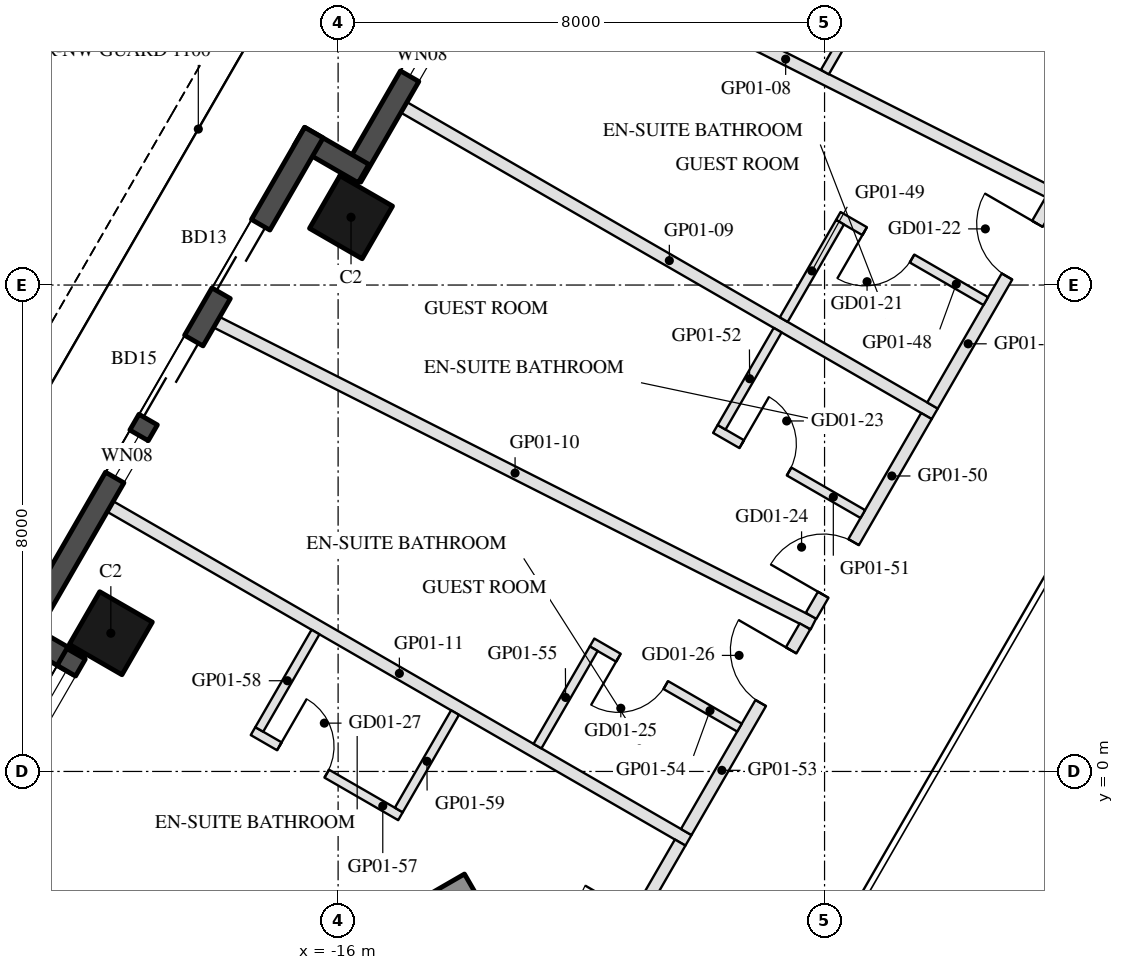
"""IFC4 building model, lengths in metres.
Left out: names, types, materials, properties, quantities, classifications, styles, units other than length and angle.
Written with IfcOpenShell. Run it as: python <this file> out.ifc"""

import sys

from ifc_helpers import new_model, si_unit, direction, frame, frame_2d, origin, origin_2d, place, context, subcontext, project, spatial, rectangle, hollow_rectangle, extrude, element, fill, save


model = new_model("IFC4")
c1 = context("Model", 3, precision=1e-05, world=origin(), true_north=direction((0.0, 1.0)))
c2 = subcontext(c1, "Body", "Model", "MODEL_VIEW")
j1 = project(units=[si_unit("LENGTHUNIT", "METRE"), si_unit("PLANEANGLEUNIT", "RADIAN")], contexts=[c1])
p1 = place(None, origin())
s1 = spatial("IfcSite", under=j1, at=p1, CompositionType="ELEMENT")
p2 = place(p1, origin())
s2 = spatial("IfcBuilding", under=s1, at=p2, CompositionType="ELEMENT")
p3 = place(p2, frame((0.0, 0.0, 50.2)))
s3 = spatial("IfcBuildingStorey", under=s2, at=p3, CompositionType="ELEMENT", Elevation=50.2)
for number, where, z_axis, x_axis in (
    (1, (-15.788, 9.115, 0.0), (0.0, 0.0, 1.0), (0.5, 0.866, 0.0)),
    (2, (-19.738, 2.273, 0.0), (0.0, 0.0, 1.0), (0.5, 0.866, 0.0)),
):
    element("IfcColumn", number, at=place(p3, frame(where, z_axis=z_axis, x_axis=x_axis)), inside=s3, PredefinedType="COLUMN", context=c2, shape_type="SweptSolid", body=[
        extrude(hollow_rectangle(XDim=1.0, YDim=1.0, WallThickness=0.045, at=origin_2d()), origin(), (0.0, 0.0, 1.0), 3.7),
    ])
p4 = place(p3, frame((-12.409, 15.617, 0.0), z_axis=(0.0, 0.0, 1.0), x_axis=(-0.500003597184, -0.866023326939, 0.0)))
e3 = element("IfcWall", 3, at=p4, inside=s3, PredefinedType="SOLIDWALL", context=c2, shape_type="SweptSolid", body=[
    extrude(rectangle(XDim=6.74, YDim=0.35, at=frame_2d((3.37, 0.0))), origin(), (0.0, 0.0, 1.0), 3.55),
])
p5 = place(p4, frame((0.32, 0.0, 0.3)))
e4 = element("IfcOpeningElement", 4, at=p5, cuts=e3, PredefinedType="OPENING", context=c2, shape_type="SweptSolid", body=[
    extrude(rectangle(XDim=1.0, YDim=2.65, at=frame_2d((0.5, 1.325))), frame((0.0, 0.185, 0.0), z_axis=(0.0, -1.0, 0.0), x_axis=(1.0, 0.0, 0.0)), (0.0, 0.0, 1.0), 0.37),
])
p6 = place(p4, frame((2.229, 0.0, 0.0)))
e5 = element("IfcOpeningElement", 5, at=p6, cuts=e3, PredefinedType="OPENING", context=c2, shape_type="SweptSolid", body=[
    extrude(rectangle(XDim=1.5, YDim=2.4, at=frame_2d((0.75, 1.2))), frame((0.0, 0.185, 0.0), z_axis=(0.0, -1.0, 0.0), x_axis=(1.0, 0.0, 0.0)), (0.0, 0.0, 1.0), 0.37),
])
p7 = place(p4, frame((4.029, 0.0, 0.3)))
e6 = element("IfcOpeningElement", 6, at=p7, cuts=e3, PredefinedType="OPENING", context=c2, shape_type="SweptSolid", body=[
    extrude(rectangle(XDim=0.8, YDim=2.65, at=frame_2d((0.4, 1.325))), frame((0.0, 0.185, 0.0), z_axis=(0.0, -1.0, 0.0), x_axis=(1.0, 0.0, 0.0)), (0.0, 0.0, 1.0), 0.37),
])
p8 = place(p3, frame((-15.581, 9.833, 0.0), z_axis=(0.0, 0.0, 1.0), x_axis=(-0.866055662726, 0.499947586314, 0.0)))
e7 = element("IfcWall", 7, at=p8, inside=s3, PredefinedType="SOLIDWALL", context=c2, shape_type="SweptSolid", body=[
    extrude(rectangle(XDim=1.22, YDim=0.35, at=frame_2d((0.61, 0.0))), origin(), (0.0, 0.0, 1.0), 3.55),
])
p9 = place(p3, frame((-16.398, 10.507, 0.0), z_axis=(0.0, 0.0, 1.0), x_axis=(-0.499999142773, -0.866025898704, 0.0)))
e8 = element("IfcWall", 8, at=p9, inside=s3, PredefinedType="SOLIDWALL", context=c2, shape_type="SweptSolid", body=[
    extrude(rectangle(XDim=9.7, YDim=0.35, at=frame_2d((4.85, 0.0))), origin(), (0.0, 0.0, 1.0), 3.55),
])
p10 = place(p9, frame((1.75, 0.0, 0.0)))
e9 = element("IfcOpeningElement", 9, at=p10, cuts=e8, PredefinedType="OPENING", context=c2, shape_type="SweptSolid", body=[
    extrude(rectangle(XDim=1.3, YDim=2.4, at=frame_2d((0.65, 1.2))), frame((0.0, 0.185, 0.0), z_axis=(0.0, -1.0, 0.0), x_axis=(1.0, 0.0, 0.0)), (0.0, 0.0, 1.0), 0.37),
])
p11 = place(p9, frame((3.95, 0.0, 0.0)))
e10 = element("IfcOpeningElement", 10, at=p11, cuts=e8, PredefinedType="OPENING", context=c2, shape_type="SweptSolid", body=[
    extrude(rectangle(XDim=1.5, YDim=2.4, at=frame_2d((0.75, 1.2))), frame((0.0, 0.185, 0.0), z_axis=(0.0, -1.0, 0.0), x_axis=(1.0, 0.0, 0.0)), (0.0, 0.0, 1.0), 0.37),
])
p12 = place(p9, frame((5.75, 0.0, 0.3)))
e11 = element("IfcOpeningElement", 11, at=p12, cuts=e8, PredefinedType="OPENING", context=c2, shape_type="SweptSolid", body=[
    extrude(rectangle(XDim=0.8, YDim=2.65, at=frame_2d((0.4, 1.325))), frame((0.0, 0.185, 0.0), z_axis=(0.0, -1.0, 0.0), x_axis=(1.0, 0.0, 0.0)), (0.0, 0.0, 1.0), 0.37),
])
p13 = place(p3, frame((-21.312, 2.346, 0.0), z_axis=(0.0, 0.0, 1.0), x_axis=(0.866005645448, -0.500034220881, 0.0)))
e12 = element("IfcWall", 12, at=p13, inside=s3, PredefinedType="SOLIDWALL", context=c2, shape_type="SweptSolid", body=[
    extrude(rectangle(XDim=1.22, YDim=0.35, at=frame_2d((0.61, 0.0))), origin(), (0.0, 0.0, 1.0), 3.55),
])
p14 = place(p3, frame((-20.309, 1.934, 0.0), z_axis=(0.0, 0.0, 1.0), x_axis=(-0.499992114976, -0.866029956157, 0.0)))
e13 = element("IfcWall", 13, at=p14, inside=s3, PredefinedType="SOLIDWALL", context=c2, shape_type="SweptSolid", body=[
    extrude(rectangle(XDim=6.74, YDim=0.35, at=frame_2d((3.37, 0.0))), origin(), (0.0, 0.0, 1.0), 3.55),
])
p15 = place(p14, frame((4.02, 0.0, 0.0)))
e14 = element("IfcOpeningElement", 14, at=p15, cuts=e13, PredefinedType="OPENING", context=c2, shape_type="SweptSolid", body=[
    extrude(rectangle(XDim=2.4, YDim=2.4, at=frame_2d((1.2, 1.2))), frame((0.0, 0.185, 0.0), z_axis=(0.0, -1.0, 0.0), x_axis=(1.0, 0.0, 0.0)), (0.0, 0.0, 1.0), 0.37),
])
p16 = place(p14, frame((0.32, 0.0, 0.3)))
e15 = element("IfcOpeningElement", 15, at=p16, cuts=e13, PredefinedType="OPENING", context=c2, shape_type="SweptSolid", body=[
    extrude(rectangle(XDim=1.5, YDim=2.65, at=frame_2d((0.75, 1.325))), frame((0.0, 0.185, 0.0), z_axis=(0.0, -1.0, 0.0), x_axis=(1.0, 0.0, 0.0)), (0.0, 0.0, 1.0), 0.37),
])
p17 = place(p14, frame((2.12, 0.0, 0.3)))
e16 = element("IfcOpeningElement", 16, at=p17, cuts=e13, PredefinedType="OPENING", context=c2, shape_type="SweptSolid", body=[
    extrude(rectangle(XDim=1.5, YDim=2.65, at=frame_2d((0.75, 1.325))), frame((0.0, 0.185, 0.0), z_axis=(0.0, -1.0, 0.0), x_axis=(1.0, 0.0, 0.0)), (0.0, 0.0, 1.0), 0.37),
])
p18 = place(p3, frame((-13.797, -1.903, 0.0), z_axis=(0.0, 0.0, 1.0), x_axis=(-0.866025009528, -0.500000682871, 0.0)))
e17 = element("IfcWall", 17, at=p18, inside=s3, PredefinedType="SHEAR", context=c2, shape_type="SweptSolid", body=[
    extrude(rectangle(XDim=14.837, YDim=0.5, at=frame_2d((7.418, 0.0))), origin(), (0.0, 0.0, 1.0), 3.5),
])
p19 = place(p3, frame((-13.147, 13.989, 0.0), z_axis=(0.0, 0.0, 1.0), x_axis=(0.892898572595, -0.450257858408, 0.0)))
e18 = element("IfcWall", 18, at=p19, inside=s3, PredefinedType="PARTITIONING", context=c2, shape_type="SweptSolid", body=[
    extrude(rectangle(XDim=10.096, YDim=0.2, at=frame_2d((5.048, 0.0))), origin(), (0.0, 0.0, 1.0), 2.96),
])
p20 = place(p3, frame((-14.917, 10.922, 0.0), z_axis=(0.0, 0.0, 1.0), x_axis=(0.866022637375, -0.500004791531, 0.0)))
e19 = element("IfcWall", 19, at=p20, inside=s3, PredefinedType="PARTITIONING", context=c2, shape_type="SweptSolid", body=[
    extrude(rectangle(XDim=10.08, YDim=0.2, at=frame_2d((5.04, 0.0))), origin(), (0.0, 0.0, 1.0), 2.96),
])
p21 = place(p3, frame((-17.997, 7.388, 0.0), z_axis=(0.0, 0.0, 1.0), x_axis=(0.892478457214, -0.451090016968, 0.0)))
e20 = element("IfcWall", 20, at=p21, inside=s3, PredefinedType="PARTITIONING", context=c2, shape_type="SweptSolid", body=[
    extrude(rectangle(XDim=10.997, YDim=0.2, at=frame_2d((5.499, 0.0))), origin(), (0.0, 0.0, 1.0), 2.96),
])
p22 = place(p3, frame((-19.747, 4.357, 0.0), z_axis=(0.0, 0.0, 1.0), x_axis=(0.866027479907, -0.499996404033, 0.0)))
e21 = element("IfcWall", 21, at=p22, inside=s3, PredefinedType="PARTITIONING", context=c2, shape_type="SweptSolid", body=[
    extrude(rectangle(XDim=10.98, YDim=0.2, at=frame_2d((5.49, 0.0))), origin(), (0.0, 0.0, 1.0), 2.96),
])
p23 = place(p3, frame((-7.068, 13.108, 0.0), z_axis=(0.0, 0.0, 1.0), x_axis=(-0.4999770169, -0.866038672677, 0.0)))
e22 = element("IfcWall", 22, at=p23, inside=s3, PredefinedType="PARTITIONING", context=c2, shape_type="SweptSolid", body=[
    extrude(rectangle(XDim=1.854, YDim=0.15, at=frame_2d((0.927, 0.0))), origin(), (0.0, 0.0, 1.0), 2.95),
])
p24 = place(p3, frame((-6.225, 6.019, 0.0), z_axis=(0.0, 0.0, 1.0), x_axis=(0.499998439657, 0.866026304647, 0.0)))
e23 = element("IfcWall", 23, at=p24, inside=s3, PredefinedType="PARTITIONING", context=c2, shape_type="SweptSolid", body=[
    extrude(rectangle(XDim=3.905, YDim=0.2, at=frame_2d((1.953, 0.0))), origin(), (0.0, 0.0, 1.0), 2.95),
])
p25 = place(p24, frame((2.45, 0.0, 0.0)))
e24 = element("IfcOpeningElement", 24, at=p25, cuts=e23, PredefinedType="OPENING", context=c2, shape_type="SweptSolid", body=[
    extrude(rectangle(XDim=1.0, YDim=2.1, at=frame_2d((0.5, 1.05))), frame((0.0, 0.11, 0.0), z_axis=(0.0, -1.0, 0.0), x_axis=(1.0, 0.0, 0.0)), (0.0, 0.0, 1.0), 0.22),
])
p26 = place(p3, frame((-5.349, 7.736, 0.0), z_axis=(0.0, 0.0, 1.0), x_axis=(-0.866056369097, 0.49994636267, 0.0)))
e25 = element("IfcWall", 25, at=p26, inside=s3, PredefinedType="PARTITIONING", context=c2, shape_type="SweptSolid", body=[
    extrude(rectangle(XDim=2.8, YDim=0.15, at=frame_2d((1.4, 0.0))), origin(), (0.0, 0.0, 1.0), 2.95),
])
p27 = place(p26, frame((1.4, 0.0, 0.0)))
e26 = element("IfcOpeningElement", 26, at=p27, cuts=e25, PredefinedType="OPENING", context=c2, shape_type="SweptSolid", body=[
    extrude(rectangle(XDim=0.9, YDim=2.1, at=frame_2d((0.45, 1.05))), frame((0.0, 0.085, 0.0), z_axis=(0.0, -1.0, 0.0), x_axis=(1.0, 0.0, 0.0)), (0.0, 0.0, 1.0), 0.17),
])
p28 = place(p3, frame((-7.746, 9.033, 0.0), z_axis=(0.0, 0.0, 1.0), x_axis=(-0.500042316284, -0.866000971088, 0.0)))
e27 = element("IfcWall", 27, at=p28, inside=s3, PredefinedType="PARTITIONING", context=c2, shape_type="SweptSolid", body=[
    extrude(rectangle(XDim=1.85, YDim=0.15, at=frame_2d((0.925, 0.0))), origin(), (0.0, 0.0, 1.0), 2.95),
])
p29 = place(p3, frame((-8.222, 2.56, 0.0), z_axis=(0.0, 0.0, 1.0), x_axis=(0.499973105789, 0.866040930607, 0.0)))
e28 = element("IfcWall", 28, at=p29, inside=s3, PredefinedType="PARTITIONING", context=c2, shape_type="SweptSolid", body=[
    extrude(rectangle(XDim=3.794, YDim=0.2, at=frame_2d((1.897, 0.0))), origin(), (0.0, 0.0, 1.0), 2.95),
])
p30 = place(p29, frame((0.4, 0.0, 0.0)))
e29 = element("IfcOpeningElement", 29, at=p30, cuts=e28, PredefinedType="OPENING", context=c2, shape_type="SweptSolid", body=[
    extrude(rectangle(XDim=1.0, YDim=2.1, at=frame_2d((0.5, 1.05))), frame((0.0, 0.11, 0.0), z_axis=(0.0, -1.0, 0.0), x_axis=(1.0, 0.0, 0.0)), (0.0, 0.0, 1.0), 0.22),
])
p31 = place(p3, frame((-9.796, 5.633, 0.0), z_axis=(0.0, 0.0, 1.0), x_axis=(0.866034573852, -0.49998411664, 0.0)))
e30 = element("IfcWall", 30, at=p31, inside=s3, PredefinedType="PARTITIONING", context=c2, shape_type="SweptSolid", body=[
    extrude(rectangle(XDim=2.8, YDim=0.15, at=frame_2d((1.4, 0.0))), origin(), (0.0, 0.0, 1.0), 2.95),
])
p32 = place(p31, frame((0.5, 0.0, 0.0)))
e31 = element("IfcOpeningElement", 31, at=p32, cuts=e30, PredefinedType="OPENING", context=c2, shape_type="SweptSolid", body=[
    extrude(rectangle(XDim=0.9, YDim=2.1, at=frame_2d((0.45, 1.05))), frame((0.0, 0.085, 0.0), z_axis=(0.0, -1.0, 0.0), x_axis=(1.0, 0.0, 0.0)), (0.0, 0.0, 1.0), 0.17),
])
p33 = place(p3, frame((-8.771, 7.258, 0.0), z_axis=(0.0, 0.0, 1.0), x_axis=(-0.500154078321, -0.865936428347, 0.0)))
e32 = element("IfcWall", 32, at=p33, inside=s3, PredefinedType="PARTITIONING", context=c2, shape_type="SweptSolid", body=[
    extrude(rectangle(XDim=1.844, YDim=0.15, at=frame_2d((0.922, 0.0))), origin(), (0.0, 0.0, 1.0), 2.95),
])
p34 = place(p3, frame((-10.275, -0.996, 0.0), z_axis=(0.0, 0.0, 1.0), x_axis=(0.499998439657, 0.866026304647, 0.0)))
e33 = element("IfcWall", 33, at=p34, inside=s3, PredefinedType="PARTITIONING", context=c2, shape_type="SweptSolid", body=[
    extrude(rectangle(XDim=3.905, YDim=0.2, at=frame_2d((1.953, 0.0))), origin(), (0.0, 0.0, 1.0), 2.95),
])
p35 = place(p34, frame((2.45, 0.0, 0.0)))
e34 = element("IfcOpeningElement", 34, at=p35, cuts=e33, PredefinedType="OPENING", context=c2, shape_type="SweptSolid", body=[
    extrude(rectangle(XDim=1.0, YDim=2.1, at=frame_2d((0.5, 1.05))), frame((0.0, 0.11, 0.0), z_axis=(0.0, -1.0, 0.0), x_axis=(1.0, 0.0, 0.0)), (0.0, 0.0, 1.0), 0.22),
])
p36 = place(p3, frame((-9.399, 0.721, 0.0), z_axis=(0.0, 0.0, 1.0), x_axis=(-0.866034573852, 0.49998411664, 0.0)))
e35 = element("IfcWall", 35, at=p36, inside=s3, PredefinedType="PARTITIONING", context=c2, shape_type="SweptSolid", body=[
    extrude(rectangle(XDim=2.8, YDim=0.15, at=frame_2d((1.4, 0.0))), origin(), (0.0, 0.0, 1.0), 2.95),
])
p37 = place(p36, frame((1.4, 0.0, 0.0)))
e36 = element("IfcOpeningElement", 36, at=p37, cuts=e35, PredefinedType="OPENING", context=c2, shape_type="SweptSolid", body=[
    extrude(rectangle(XDim=0.9, YDim=2.1, at=frame_2d((0.45, 1.05))), frame((0.0, 0.085, 0.0), z_axis=(0.0, -1.0, 0.0), x_axis=(1.0, 0.0, 0.0)), (0.0, 0.0, 1.0), 0.17),
])
p38 = place(p3, frame((-11.796, 2.019, 0.0), z_axis=(0.0, 0.0, 1.0), x_axis=(-0.499985172903, -0.866033964044, 0.0)))
e37 = element("IfcWall", 37, at=p38, inside=s3, PredefinedType="PARTITIONING", context=c2, shape_type="SweptSolid", body=[
    extrude(rectangle(XDim=1.85, YDim=0.15, at=frame_2d((0.925, 0.0))), origin(), (0.0, 0.0, 1.0), 3.55),
])
p39 = place(p3, frame((-12.269, -4.45, 0.0), z_axis=(0.0, 0.0, 1.0), x_axis=(0.500055316652, 0.865993464345, 0.0)))
e38 = element("IfcWall", 38, at=p39, inside=s3, PredefinedType="PARTITIONING", context=c2, shape_type="SweptSolid", body=[
    extrude(rectangle(XDim=3.788, YDim=0.2, at=frame_2d((1.894, 0.0))), origin(), (0.0, 0.0, 1.0), 2.95),
])
p40 = place(p39, frame((1.394, 0.0, 0.0)))
e39 = element("IfcOpeningElement", 39, at=p40, cuts=e38, PredefinedType="OPENING", context=c2, shape_type="SweptSolid", body=[
    extrude(rectangle(XDim=1.0, YDim=2.1, at=frame_2d((0.5, 1.05))), frame((0.0, 0.11, 0.0), z_axis=(0.0, -1.0, 0.0), x_axis=(1.0, 0.0, 0.0)), (0.0, 0.0, 1.0), 0.22),
])
p41 = place(p3, frame((-17.399, 0.664, 0.0), z_axis=(0.0, 0.0, 1.0), x_axis=(0.866018616679, -0.500011755427, 0.0)))
e40 = element("IfcWall", 40, at=p41, inside=s3, PredefinedType="PARTITIONING", context=c2, shape_type="SweptSolid", body=[
    extrude(rectangle(XDim=2.8, YDim=0.15, at=frame_2d((1.4, 0.0))), origin(), (0.0, 0.0, 1.0), 3.55),
])
p42 = place(p41, frame((0.5, 0.0, 0.0)))
e41 = element("IfcOpeningElement", 41, at=p42, cuts=e40, PredefinedType="OPENING", context=c2, shape_type="SweptSolid", body=[
    extrude(rectangle(XDim=0.9, YDim=2.1, at=frame_2d((0.45, 1.05))), frame((0.0, 0.085, 0.0), z_axis=(0.0, -1.0, 0.0), x_axis=(1.0, 0.0, 0.0)), (0.0, 0.0, 1.0), 0.17),
])
p43 = place(p3, frame((-16.372, 2.293, 0.0), z_axis=(0.0, 0.0, 1.0), x_axis=(-0.499985172903, -0.866033964044, 0.0)))
e42 = element("IfcWall", 42, at=p43, inside=s3, PredefinedType="PARTITIONING", context=c2, shape_type="SweptSolid", body=[
    extrude(rectangle(XDim=1.85, YDim=0.15, at=frame_2d((0.925, 0.0))), origin(), (0.0, 0.0, 1.0), 2.95),
])
p44 = place(p3, frame((-14.077, 0.968, 0.0), z_axis=(0.0, 0.0, 1.0), x_axis=(-0.500042316284, -0.866000971088, 0.0)))
e43 = element("IfcWall", 43, at=p44, inside=s3, PredefinedType="PARTITIONING", context=c2, shape_type="SweptSolid", body=[
    extrude(rectangle(XDim=1.85, YDim=0.15, at=frame_2d((0.925, 0.0))), origin(), (0.0, 0.0, 1.0), 2.95),
])
p45 = place(p7, origin())
e44 = element("IfcWindow", 44, at=p45, inside=s3, PartitioningType="SINGLE_PANEL", PredefinedType="WINDOW", context=c2, shape_type="SweptSolid", body=[
    extrude(rectangle(XDim=0.8, YDim=2.65, at=frame_2d((0.4, 1.325))), frame((0.0, 0.03, 0.0), z_axis=(0.0, -1.0, 0.0), x_axis=(1.0, 0.0, 0.0)), (0.0, 0.0, 1.0), 0.06),
])
fill(e6, e44)
p46 = place(p10, frame((1.3, 0.0, 0.0), z_axis=(0.0, 0.0, 1.0), x_axis=(-1.0, 0.0, 0.0)))
e45 = element("IfcDoor", 45, at=p46, inside=s3, OperationType="SLIDING_TO_LEFT", PredefinedType="DOOR", context=c2, shape_type="SweptSolid", body=[
    extrude(rectangle(XDim=1.3, YDim=2.4, at=frame_2d((0.65, 1.2))), frame((0.0, 0.025, 0.0), z_axis=(0.0, -1.0, 0.0), x_axis=(1.0, 0.0, 0.0)), (0.0, 0.0, 1.0), 0.05),
])
fill(e9, e45)
p47 = place(p11, frame((1.5, 0.0, 0.0), z_axis=(0.0, 0.0, 1.0), x_axis=(-1.0, 0.0, 0.0)))
e46 = element("IfcDoor", 46, at=p47, inside=s3, OperationType="SLIDING_TO_LEFT", PredefinedType="DOOR", context=c2, shape_type="SweptSolid", body=[
    extrude(rectangle(XDim=1.5, YDim=2.4, at=frame_2d((0.75, 1.2))), frame((0.0, 0.025, 0.0), z_axis=(0.0, -1.0, 0.0), x_axis=(1.0, 0.0, 0.0)), (0.0, 0.0, 1.0), 0.05),
])
fill(e10, e46)
p48 = place(p12, origin())
e47 = element("IfcWindow", 47, at=p48, inside=s3, PartitioningType="SINGLE_PANEL", PredefinedType="WINDOW", context=c2, shape_type="SweptSolid", body=[
    extrude(rectangle(XDim=0.8, YDim=2.65, at=frame_2d((0.4, 1.325))), frame((0.0, 0.03, 0.0), z_axis=(0.0, -1.0, 0.0), x_axis=(1.0, 0.0, 0.0)), (0.0, 0.0, 1.0), 0.06),
])
fill(e11, e47)
p49 = place(p16, origin())
e48 = element("IfcWindow", 48, at=p49, inside=s3, PartitioningType="SINGLE_PANEL", PredefinedType="WINDOW", context=c2, shape_type="SweptSolid", body=[
    extrude(rectangle(XDim=1.5, YDim=2.65, at=frame_2d((0.75, 1.325))), frame((0.0, 0.03, 0.0), z_axis=(0.0, -1.0, 0.0), x_axis=(1.0, 0.0, 0.0)), (0.0, 0.0, 1.0), 0.06),
])
fill(e15, e48)
p50 = place(p27, origin())
e49 = element("IfcDoor", 49, at=p50, inside=s3, OperationType="SINGLE_SWING_RIGHT", PredefinedType="DOOR", context=c2, shape_type="SweptSolid", body=[
    extrude(rectangle(XDim=0.9, YDim=2.1, at=frame_2d((0.45, 1.05))), frame((0.0, 0.025, 0.0), z_axis=(0.0, -1.0, 0.0), x_axis=(1.0, 0.0, 0.0)), (0.0, 0.0, 1.0), 0.05),
])
fill(e26, e49)
p51 = place(p25, origin())
e50 = element("IfcDoor", 50, at=p51, inside=s3, OperationType="SINGLE_SWING_RIGHT", PredefinedType="DOOR", context=c2, shape_type="SweptSolid", body=[
    extrude(rectangle(XDim=1.0, YDim=2.1, at=frame_2d((0.5, 1.05))), frame((0.0, 0.025, 0.0), z_axis=(0.0, -1.0, 0.0), x_axis=(1.0, 0.0, 0.0)), (0.0, 0.0, 1.0), 0.05),
])
fill(e24, e50)
p52 = place(p32, origin())
e51 = element("IfcDoor", 51, at=p52, inside=s3, OperationType="SINGLE_SWING_LEFT", PredefinedType="DOOR", context=c2, shape_type="SweptSolid", body=[
    extrude(rectangle(XDim=0.9, YDim=2.1, at=frame_2d((0.45, 1.05))), frame((0.0, 0.025, 0.0), z_axis=(0.0, -1.0, 0.0), x_axis=(1.0, 0.0, 0.0)), (0.0, 0.0, 1.0), 0.05),
])
fill(e31, e51)
p53 = place(p30, origin())
e52 = element("IfcDoor", 52, at=p53, inside=s3, OperationType="SINGLE_SWING_LEFT", PredefinedType="DOOR", context=c2, shape_type="SweptSolid", body=[
    extrude(rectangle(XDim=1.0, YDim=2.1, at=frame_2d((0.5, 1.05))), frame((0.0, 0.025, 0.0), z_axis=(0.0, -1.0, 0.0), x_axis=(1.0, 0.0, 0.0)), (0.0, 0.0, 1.0), 0.05),
])
fill(e29, e52)
p54 = place(p37, origin())
e53 = element("IfcDoor", 53, at=p54, inside=s3, OperationType="SINGLE_SWING_RIGHT", PredefinedType="DOOR", context=c2, shape_type="SweptSolid", body=[
    extrude(rectangle(XDim=0.9, YDim=2.1, at=frame_2d((0.45, 1.05))), frame((0.0, 0.025, 0.0), z_axis=(0.0, -1.0, 0.0), x_axis=(1.0, 0.0, 0.0)), (0.0, 0.0, 1.0), 0.05),
])
fill(e36, e53)
p55 = place(p35, origin())
e54 = element("IfcDoor", 54, at=p55, inside=s3, OperationType="SINGLE_SWING_RIGHT", PredefinedType="DOOR", context=c2, shape_type="SweptSolid", body=[
    extrude(rectangle(XDim=1.0, YDim=2.1, at=frame_2d((0.5, 1.05))), frame((0.0, 0.025, 0.0), z_axis=(0.0, -1.0, 0.0), x_axis=(1.0, 0.0, 0.0)), (0.0, 0.0, 1.0), 0.05),
])
fill(e34, e54)
p56 = place(p42, origin())
e55 = element("IfcDoor", 55, at=p56, inside=s3, OperationType="SINGLE_SWING_LEFT", PredefinedType="DOOR", context=c2, shape_type="SweptSolid", body=[
    extrude(rectangle(XDim=0.9, YDim=2.1, at=frame_2d((0.45, 1.05))), frame((0.0, 0.025, 0.0), z_axis=(0.0, -1.0, 0.0), x_axis=(1.0, 0.0, 0.0)), (0.0, 0.0, 1.0), 0.05),
])
fill(e41, e55)
save(model, sys.argv[1])
